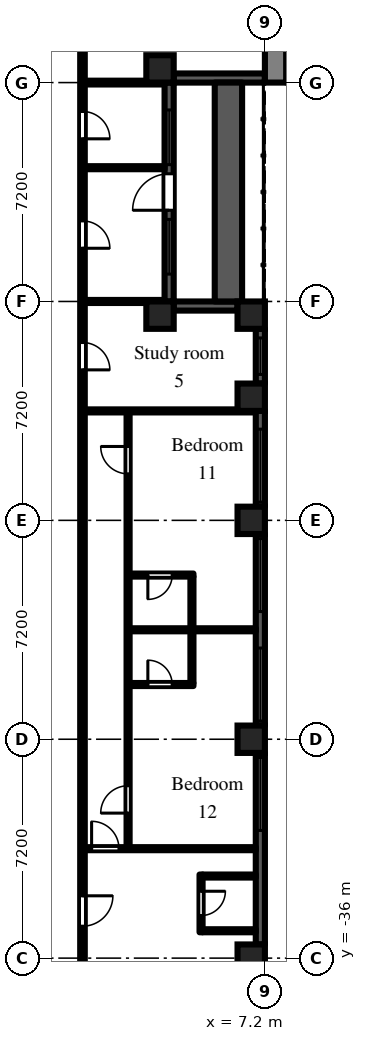
"""IFC4 building model, lengths in metres.
Left out: names, types, materials, properties, quantities, classifications, styles, units other than length and angle.
Written with IfcOpenShell. Run it as: python <this file> out.ifc"""

import sys

from ifc_helpers import new_model, si_unit, direction, frame, frame_2d, origin, origin_2d, place, context, subcontext, project, spatial, rectangle, extrude, element, fill, save


model = new_model("IFC4")
c1 = context("Model", 3, precision=1e-05, world=origin(), true_north=direction((0.0, 1.0)))
c2 = subcontext(c1, "Body", "Model", "MODEL_VIEW")
j1 = project(units=[si_unit("LENGTHUNIT", "METRE"), si_unit("PLANEANGLEUNIT", "RADIAN")], contexts=[c1])
p1 = place(None, origin())
s1 = spatial("IfcSite", under=j1, at=p1, CompositionType="ELEMENT")
p2 = place(p1, origin())
s2 = spatial("IfcBuilding", under=s1, at=p2, CompositionType="ELEMENT")
p3 = place(p2, frame((0.0, 0.0, 11.7)))
s3 = spatial("IfcBuildingStorey", under=s2, at=p3, CompositionType="ELEMENT", Elevation=11.7)
for number, where, z_axis, x_axis in (
    (1, (3.75, -14.85, 0.0), (0.0, 0.0, 1.0), (1.0, 0.0, 0.0)),
    (2, (3.75, -6.75, 0.0), (0.0, 0.0, 1.0), (1.0, 0.0, 0.0)),
    (3, (6.75, -36.0, 0.0), (0.0, 0.0, 1.0), (1.0, 0.0, 0.0)),
    (4, (6.75, -28.8, 0.0), (0.0, 0.0, 1.0), (1.0, 0.0, 0.0)),
    (5, (6.75, -21.6, 0.0), (0.0, 0.0, 1.0), (1.0, 0.0, 0.0)),
    (6, (6.75, -17.55, 0.0), (0.0, 0.0, 1.0), (1.0, 0.0, 0.0)),
    (7, (6.75, -14.85, 0.0), (0.0, 0.0, 1.0), (1.0, 0.0, 0.0)),
):
    element("IfcColumn", number, at=place(p3, frame(where, z_axis=z_axis, x_axis=x_axis)), inside=s3, PredefinedType="COLUMN", context=c2, shape_type="SweptSolid", body=[
        extrude(rectangle(XDim=0.9, YDim=0.9, at=origin_2d()), origin(), (0.0, 0.0, 1.0), 3.0),
    ])
p4 = place(p3, frame((7.05, -35.55, 0.0), z_axis=(0.0, 0.0, 1.0), x_axis=(0.0, 1.0, 0.0)))
e8 = element("IfcWall", 8, at=p4, inside=s3, PredefinedType="SOLIDWALL", context=c2, shape_type="SweptSolid", body=[
    extrude(rectangle(XDim=6.3, YDim=0.3, at=frame_2d((3.15, 0.0))), origin(), (0.0, 0.0, 1.0), 2.1),
])
p5 = place(p4, frame((3.75, 0.0, 0.2)))
e9 = element("IfcOpeningElement", 9, at=p5, cuts=e8, PredefinedType="OPENING", context=c2, shape_type="SweptSolid", body=[
    extrude(rectangle(XDim=2.4, YDim=1.85, at=frame_2d((1.2, 0.925))), frame((0.0, 0.16, 0.0), z_axis=(0.0, -1.0, 0.0), x_axis=(1.0, 0.0, 0.0)), (0.0, 0.0, 1.0), 0.32),
])
p6 = place(p3, frame((7.05, -28.35, 0.0), z_axis=(0.0, 0.0, 1.0), x_axis=(0.0, 1.0, 0.0)))
e10 = element("IfcWall", 10, at=p6, inside=s3, PredefinedType="SOLIDWALL", context=c2, shape_type="SweptSolid", body=[
    extrude(rectangle(XDim=6.3, YDim=0.3, at=frame_2d((3.15, 0.0))), origin(), (0.0, 0.0, 1.0), 2.1),
])
p7 = place(p6, frame((0.15, 0.0, 0.2)))
e11 = element("IfcOpeningElement", 11, at=p7, cuts=e10, PredefinedType="OPENING", context=c2, shape_type="SweptSolid", body=[
    extrude(rectangle(XDim=2.4, YDim=1.85, at=frame_2d((1.2, 0.925))), frame((0.0, 0.16, 0.0), z_axis=(0.0, -1.0, 0.0), x_axis=(1.0, 0.0, 0.0)), (0.0, 0.0, 1.0), 0.32),
])
p8 = place(p6, frame((3.75, 0.0, 0.2)))
e12 = element("IfcOpeningElement", 12, at=p8, cuts=e10, PredefinedType="OPENING", context=c2, shape_type="SweptSolid", body=[
    extrude(rectangle(XDim=2.4, YDim=1.85, at=frame_2d((1.2, 0.925))), frame((0.0, 0.16, 0.0), z_axis=(0.0, -1.0, 0.0), x_axis=(1.0, 0.0, 0.0)), (0.0, 0.0, 1.0), 0.32),
])
p9 = place(p3, frame((7.05, -21.15, 0.0), z_axis=(0.0, 0.0, 1.0), x_axis=(0.0, 1.0, 0.0)))
e13 = element("IfcWall", 13, at=p9, inside=s3, PredefinedType="SOLIDWALL", context=c2, shape_type="SweptSolid", body=[
    extrude(rectangle(XDim=3.15, YDim=0.3, at=frame_2d((1.575, 0.0))), origin(), (0.0, 0.0, 1.0), 2.1),
])
p10 = place(p9, frame((0.15, 0.0, 0.2)))
e14 = element("IfcOpeningElement", 14, at=p10, cuts=e13, PredefinedType="OPENING", context=c2, shape_type="SweptSolid", body=[
    extrude(rectangle(XDim=2.4, YDim=1.85, at=frame_2d((1.2, 0.925))), frame((0.0, 0.16, 0.0), z_axis=(0.0, -1.0, 0.0), x_axis=(1.0, 0.0, 0.0)), (0.0, 0.0, 1.0), 0.32),
])
p11 = place(p3, frame((7.05, -17.1, 0.0), z_axis=(0.0, 0.0, 1.0), x_axis=(0.0, 1.0, 0.0)))
e15 = element("IfcWall", 15, at=p11, inside=s3, PredefinedType="SOLIDWALL", context=c2, shape_type="SweptSolid", body=[
    extrude(rectangle(XDim=1.8, YDim=0.3, at=frame_2d((0.9, 0.0))), origin(), (0.0, 0.0, 1.0), 2.1),
])
p12 = place(p11, frame((0.3, 0.0, 0.2)))
e16 = element("IfcOpeningElement", 16, at=p12, cuts=e15, PredefinedType="OPENING", context=c2, shape_type="SweptSolid", body=[
    extrude(rectangle(XDim=1.2, YDim=1.85, at=frame_2d((0.6, 0.925))), frame((0.0, 0.16, 0.0), z_axis=(0.0, -1.0, 0.0), x_axis=(1.0, 0.0, 0.0)), (0.0, 0.0, 1.0), 0.32),
])
p13 = place(p3, frame((6.3, -14.55, 0.0), z_axis=(0.0, 0.0, 1.0), x_axis=(-1.0, 0.0, 0.0)))
e17 = element("IfcWall", 17, at=p13, inside=s3, PredefinedType="SOLIDWALL", context=c2, shape_type="SweptSolid", body=[
    extrude(rectangle(XDim=2.1, YDim=0.3, at=frame_2d((1.05, 0.0))), origin(), (0.0, 0.0, 1.0), 2.1),
])
p14 = place(p3, frame((4.05, -14.4, 0.0), z_axis=(0.0, 0.0, 1.0), x_axis=(0.0, 1.0, 0.0)))
e18 = element("IfcWall", 18, at=p14, inside=s3, PredefinedType="SOLIDWALL", context=c2, shape_type="SweptSolid", body=[
    extrude(rectangle(XDim=7.2, YDim=0.3, at=frame_2d((3.6, 0.0))), origin(), (0.0, 0.0, 1.0), 2.1),
])
p15 = place(p14, frame((3.0, 0.0, 0.0)))
e19 = element("IfcOpeningElement", 19, at=p15, cuts=e18, PredefinedType="OPENING", context=c2, shape_type="SweptSolid", body=[
    extrude(rectangle(XDim=1.2, YDim=2.05, at=frame_2d((0.6, 1.025))), frame((0.0, 0.16, 0.0), z_axis=(0.0, -1.0, 0.0), x_axis=(1.0, 0.0, 0.0)), (0.0, 0.0, 1.0), 0.32),
])
p16 = place(p14, frame((0.9, 0.0, 0.2)))
e20 = element("IfcOpeningElement", 20, at=p16, cuts=e18, PredefinedType="OPENING", context=c2, shape_type="SweptSolid", body=[
    extrude(rectangle(XDim=1.8, YDim=1.85, at=frame_2d((0.9, 0.925))), frame((0.0, 0.16, 0.0), z_axis=(0.0, -1.0, 0.0), x_axis=(1.0, 0.0, 0.0)), (0.0, 0.0, 1.0), 0.32),
])
p17 = place(p14, frame((4.5, 0.0, 0.2)))
e21 = element("IfcOpeningElement", 21, at=p17, cuts=e18, PredefinedType="OPENING", context=c2, shape_type="SweptSolid", body=[
    extrude(rectangle(XDim=1.8, YDim=1.85, at=frame_2d((0.9, 0.925))), frame((0.0, 0.16, 0.0), z_axis=(0.0, -1.0, 0.0), x_axis=(1.0, 0.0, 0.0)), (0.0, 0.0, 1.0), 0.32),
])
p18 = place(p3, frame((4.2, -7.05, 0.0), z_axis=(0.0, 0.0, 1.0), x_axis=(1.0, 0.0, 0.0)))
e22 = element("IfcWall", 22, at=p18, inside=s3, PredefinedType="SOLIDWALL", context=c2, shape_type="SweptSolid", body=[
    extrude(rectangle(XDim=3.0, YDim=0.3, at=frame_2d((1.5, 0.0))), origin(), (0.0, 0.0, 1.0), 2.1),
])
p19 = place(p3, frame((6.0, -14.4, 0.0), z_axis=(0.0, 0.0, 1.0), x_axis=(0.0, 1.0, 0.0)))
e23 = element("IfcWall", 23, at=p19, inside=s3, PredefinedType="PARAPET", context=c2, shape_type="SweptSolid", body=[
    extrude(rectangle(XDim=7.2, YDim=0.9, at=frame_2d((3.6, 0.0))), origin(), (0.0, 0.0, 1.0), 0.8),
])
p20 = place(p3, frame((7.55, -7.2, 0.0), z_axis=(0.0, 0.0, 1.0), x_axis=(0.0, 1.0, 0.0)))
e24 = element("IfcWall", 24, at=p20, inside=s3, PredefinedType="SHEAR", context=c2, shape_type="SweptSolid", body=[
    extrude(rectangle(XDim=14.4, YDim=0.7, at=frame_2d((7.2, 0.0))), origin(), (0.0, 0.0, 1.0), 2.575),
])
p21 = place(p20, frame((6.0, 0.0, 0.0)))
e25 = element("IfcOpeningElement", 25, at=p21, cuts=e24, PredefinedType="OPENING", context=c2, shape_type="SweptSolid", body=[
    extrude(rectangle(XDim=2.4, YDim=2.2, at=frame_2d((1.2, 1.1))), frame((0.0, 0.36, 0.0), z_axis=(0.0, -1.0, 0.0), x_axis=(1.0, 0.0, 0.0)), (0.0, 0.0, 1.0), 0.72),
])
p22 = place(p3, frame((1.2, -36.5, 0.0), z_axis=(0.0, 0.0, 1.0), x_axis=(0.0, 1.0, 0.0)))
e26 = element("IfcWall", 26, at=p22, inside=s3, PredefinedType="PARTITIONING", context=c2, shape_type="SweptSolid", body=[
    extrude(rectangle(XDim=35.375, YDim=0.15, at=frame_2d((17.688, 0.0))), origin(), (0.0, 0.0, 1.0), 2.575),
])
p23 = place(p22, frame((33.65, 0.0, 0.0)))
e27 = element("IfcOpeningElement", 27, at=p23, cuts=e26, PredefinedType="OPENING", context=c2, shape_type="SweptSolid", body=[
    extrude(rectangle(XDim=0.9, YDim=2.1, at=frame_2d((0.45, 1.05))), frame((0.0, 0.085, 0.0), z_axis=(0.0, -1.0, 0.0), x_axis=(1.0, 0.0, 0.0)), (0.0, 0.0, 1.0), 0.17),
])
p24 = place(p22, frame((30.65, 0.0, 0.0)))
e28 = element("IfcOpeningElement", 28, at=p24, cuts=e26, PredefinedType="OPENING", context=c2, shape_type="SweptSolid", body=[
    extrude(rectangle(XDim=0.9, YDim=2.1, at=frame_2d((0.45, 1.05))), frame((0.0, 0.085, 0.0), z_axis=(0.0, -1.0, 0.0), x_axis=(1.0, 0.0, 0.0)), (0.0, 0.0, 1.0), 0.17),
])
p25 = place(p22, frame((27.45, 0.0, 0.0)))
e29 = element("IfcOpeningElement", 29, at=p25, cuts=e26, PredefinedType="OPENING", context=c2, shape_type="SweptSolid", body=[
    extrude(rectangle(XDim=0.9, YDim=2.1, at=frame_2d((0.45, 1.05))), frame((0.0, 0.085, 0.0), z_axis=(0.0, -1.0, 0.0), x_axis=(1.0, 0.0, 0.0)), (0.0, 0.0, 1.0), 0.17),
])
p26 = place(p22, frame((23.85, 0.0, 0.0)))
e30 = element("IfcOpeningElement", 30, at=p26, cuts=e26, PredefinedType="OPENING", context=c2, shape_type="SweptSolid", body=[
    extrude(rectangle(XDim=0.9, YDim=2.1, at=frame_2d((0.45, 1.05))), frame((0.0, 0.085, 0.0), z_axis=(0.0, -1.0, 0.0), x_axis=(1.0, 0.0, 0.0)), (0.0, 0.0, 1.0), 0.17),
])
p27 = place(p22, frame((19.85, 0.0, 0.0)))
e31 = element("IfcOpeningElement", 31, at=p27, cuts=e26, PredefinedType="OPENING", context=c2, shape_type="SweptSolid", body=[
    extrude(rectangle(XDim=0.9, YDim=2.1, at=frame_2d((0.45, 1.05))), frame((0.0, 0.085, 0.0), z_axis=(0.0, -1.0, 0.0), x_axis=(1.0, 0.0, 0.0)), (0.0, 0.0, 1.0), 0.17),
])
p28 = place(p22, frame((1.55, 0.0, 0.0)))
e32 = element("IfcOpeningElement", 32, at=p28, cuts=e26, PredefinedType="OPENING", context=c2, shape_type="SweptSolid", body=[
    extrude(rectangle(XDim=1.0, YDim=2.1, at=frame_2d((0.5, 1.05))), frame((0.0, 0.085, 0.0), z_axis=(0.0, -1.0, 0.0), x_axis=(1.0, 0.0, 0.0)), (0.0, 0.0, 1.0), 0.17),
])
p29 = place(p3, frame((1.275, -32.4, 0.0), z_axis=(0.0, 0.0, 1.0), x_axis=(1.0, 0.0, 0.0)))
e33 = element("IfcWall", 33, at=p29, inside=s3, PredefinedType="PARTITIONING", context=c2, shape_type="SweptSolid", body=[
    extrude(rectangle(XDim=5.625, YDim=0.1, at=frame_2d((2.812, 0.0))), origin(), (0.0, 0.0, 1.0), 2.575),
])
p30 = place(p29, frame((0.225, 0.0, 0.0)))
e34 = element("IfcOpeningElement", 34, at=p30, cuts=e33, PredefinedType="OPENING", context=c2, shape_type="SweptSolid", body=[
    extrude(rectangle(XDim=0.9, YDim=2.1, at=frame_2d((0.45, 1.05))), frame((0.0, 0.06, 0.0), z_axis=(0.0, -1.0, 0.0), x_axis=(1.0, 0.0, 0.0)), (0.0, 0.0, 1.0), 0.12),
])
p31 = place(p3, frame((1.275, -18.0, 0.0), z_axis=(0.0, 0.0, 1.0), x_axis=(1.0, 0.0, 0.0)))
e35 = element("IfcWall", 35, at=p31, inside=s3, PredefinedType="PARTITIONING", context=c2, shape_type="SweptSolid", body=[
    extrude(rectangle(XDim=5.625, YDim=0.1, at=frame_2d((2.812, 0.0))), origin(), (0.0, 0.0, 1.0), 2.575),
])
for number, where, z_axis, x_axis in (
    (36, (1.275, -14.4, 0.0), (0.0, 0.0, 1.0), (1.0, 0.0, 0.0)),
    (37, (1.275, -10.0, 0.0), (0.0, 0.0, 1.0), (1.0, 0.0, 0.0)),
):
    element("IfcWall", number, at=place(p3, frame(where, z_axis=z_axis, x_axis=x_axis)), inside=s3, PredefinedType="PARTITIONING", context=c2, shape_type="SweptSolid", body=[
        extrude(rectangle(XDim=2.625, YDim=0.1, at=frame_2d((1.312, 0.0))), origin(), (0.0, 0.0, 1.0), 2.575),
    ])
p32 = place(p3, frame((1.275, -7.2, 0.0), z_axis=(0.0, 0.0, 1.0), x_axis=(1.0, 0.0, 0.0)))
e38 = element("IfcWall", 38, at=p32, inside=s3, PredefinedType="PARTITIONING", context=c2, shape_type="SweptSolid", body=[
    extrude(rectangle(XDim=2.625, YDim=0.125, at=frame_2d((1.312, 0.0))), origin(), (0.0, 0.0, 1.0), 2.575),
])
p33 = place(p3, frame((2.7, -32.35, 0.0), z_axis=(0.0, 0.0, 1.0), x_axis=(0.0, 1.0, 0.0)))
e39 = element("IfcWall", 39, at=p33, inside=s3, PredefinedType="PARTITIONING", context=c2, shape_type="SweptSolid", body=[
    extrude(rectangle(XDim=14.3, YDim=0.1, at=frame_2d((7.15, 0.0))), origin(), (0.0, 0.0, 1.0), 2.575),
])
p34 = place(p33, frame((1.12, 0.0, 0.0)))
e40 = element("IfcOpeningElement", 40, at=p34, cuts=e39, PredefinedType="OPENING", context=c2, shape_type="SweptSolid", body=[
    extrude(rectangle(XDim=0.9, YDim=2.1, at=frame_2d((0.45, 1.05))), frame((0.0, 0.06, 0.0), z_axis=(0.0, -1.0, 0.0), x_axis=(1.0, 0.0, 0.0)), (0.0, 0.0, 1.0), 0.12),
])
p35 = place(p33, frame((12.28, 0.0, 0.0)))
e41 = element("IfcOpeningElement", 41, at=p35, cuts=e39, PredefinedType="OPENING", context=c2, shape_type="SweptSolid", body=[
    extrude(rectangle(XDim=0.9, YDim=2.1, at=frame_2d((0.45, 1.05))), frame((0.0, 0.06, 0.0), z_axis=(0.0, -1.0, 0.0), x_axis=(1.0, 0.0, 0.0)), (0.0, 0.0, 1.0), 0.12),
])
p36 = place(p3, frame((2.75, -27.0, 0.0), z_axis=(0.0, 0.0, 1.0), x_axis=(1.0, 0.0, 0.0)))
e42 = element("IfcWall", 42, at=p36, inside=s3, PredefinedType="PARTITIONING", context=c2, shape_type="SweptSolid", body=[
    extrude(rectangle(XDim=2.1, YDim=0.1, at=frame_2d((1.05, 0.0))), origin(), (0.0, 0.0, 1.0), 2.575),
])
p37 = place(p36, frame((0.6, 0.0, 0.0)))
e43 = element("IfcOpeningElement", 43, at=p37, cuts=e42, PredefinedType="OPENING", context=c2, shape_type="SweptSolid", body=[
    extrude(rectangle(XDim=0.8, YDim=2.1, at=frame_2d((0.4, 1.05))), frame((0.0, 0.06, 0.0), z_axis=(0.0, -1.0, 0.0), x_axis=(1.0, 0.0, 0.0)), (0.0, 0.0, 1.0), 0.12),
])
p38 = place(p3, frame((2.75, -25.2, 0.0), z_axis=(0.0, 0.0, 1.0), x_axis=(1.0, 0.0, 0.0)))
e44 = element("IfcWall", 44, at=p38, inside=s3, PredefinedType="PARTITIONING", context=c2, shape_type="SweptSolid", body=[
    extrude(rectangle(XDim=4.15, YDim=0.1, at=frame_2d((2.075, 0.0))), origin(), (0.0, 0.0, 1.0), 2.575),
])
p39 = place(p3, frame((2.75, -23.4, 0.0), z_axis=(0.0, 0.0, 1.0), x_axis=(1.0, 0.0, 0.0)))
e45 = element("IfcWall", 45, at=p39, inside=s3, PredefinedType="PARTITIONING", context=c2, shape_type="SweptSolid", body=[
    extrude(rectangle(XDim=2.1, YDim=0.1, at=frame_2d((1.05, 0.0))), origin(), (0.0, 0.0, 1.0), 2.575),
])
p40 = place(p39, frame((0.6, 0.0, 0.0)))
e46 = element("IfcOpeningElement", 46, at=p40, cuts=e45, PredefinedType="OPENING", context=c2, shape_type="SweptSolid", body=[
    extrude(rectangle(XDim=0.8, YDim=2.1, at=frame_2d((0.4, 1.05))), frame((0.0, 0.06, 0.0), z_axis=(0.0, -1.0, 0.0), x_axis=(1.0, 0.0, 0.0)), (0.0, 0.0, 1.0), 0.12),
])
p41 = place(p3, frame((4.8, -26.95, 0.0), z_axis=(0.0, 0.0, 1.0), x_axis=(0.0, 1.0, 0.0)))
e47 = element("IfcWall", 47, at=p41, inside=s3, PredefinedType="PARTITIONING", context=c2, shape_type="SweptSolid", body=[
    extrude(rectangle(XDim=3.5, YDim=0.1, at=frame_2d((1.75, 0.0))), origin(), (0.0, 0.0, 1.0), 2.575),
])
p42 = place(p3, frame((5.1, -35.15, 0.0), z_axis=(0.0, 0.0, 1.0), x_axis=(0.0, 1.0, 0.0)))
e48 = element("IfcWall", 48, at=p42, inside=s3, PredefinedType="PARTITIONING", context=c2, shape_type="SweptSolid", body=[
    extrude(rectangle(XDim=1.9, YDim=0.1, at=frame_2d((0.95, 0.0))), origin(), (0.0, 0.0, 1.0), 2.575),
])
p43 = place(p42, frame((0.55, 0.0, 0.0)))
e49 = element("IfcOpeningElement", 49, at=p43, cuts=e48, PredefinedType="OPENING", context=c2, shape_type="SweptSolid", body=[
    extrude(rectangle(XDim=0.8, YDim=2.1, at=frame_2d((0.4, 1.05))), frame((0.0, 0.06, 0.0), z_axis=(0.0, -1.0, 0.0), x_axis=(1.0, 0.0, 0.0)), (0.0, 0.0, 1.0), 0.12),
])
for number, where, z_axis, x_axis in (
    (50, (5.15, -35.1, 0.0), (0.0, 0.0, 1.0), (1.0, 0.0, 0.0)),
    (51, (5.15, -33.3, 0.0), (0.0, 0.0, 1.0), (1.0, 0.0, 0.0)),
):
    element("IfcWall", number, at=place(p3, frame(where, z_axis=z_axis, x_axis=x_axis)), inside=s3, PredefinedType="PARTITIONING", context=c2, shape_type="SweptSolid", body=[
        extrude(rectangle(XDim=1.75, YDim=0.1, at=frame_2d((0.875, 0.0))), origin(), (0.0, 0.0, 1.0), 2.575),
    ])
p44 = place(p5, origin())
e52 = element("IfcWindow", 52, at=p44, inside=s3, PartitioningType="SINGLE_PANEL", PredefinedType="WINDOW", context=c2, shape_type="SweptSolid", body=[
    extrude(rectangle(XDim=2.4, YDim=1.85, at=frame_2d((1.2, 0.925))), frame((0.0, 0.03, 0.0), z_axis=(0.0, -1.0, 0.0), x_axis=(1.0, 0.0, 0.0)), (0.0, 0.0, 1.0), 0.06),
])
fill(e9, e52)
p45 = place(p7, origin())
e53 = element("IfcWindow", 53, at=p45, inside=s3, PartitioningType="SINGLE_PANEL", PredefinedType="WINDOW", context=c2, shape_type="SweptSolid", body=[
    extrude(rectangle(XDim=2.4, YDim=1.85, at=frame_2d((1.2, 0.925))), frame((0.0, 0.03, 0.0), z_axis=(0.0, -1.0, 0.0), x_axis=(1.0, 0.0, 0.0)), (0.0, 0.0, 1.0), 0.06),
])
fill(e11, e53)
p46 = place(p8, origin())
e54 = element("IfcWindow", 54, at=p46, inside=s3, PartitioningType="SINGLE_PANEL", PredefinedType="WINDOW", context=c2, shape_type="SweptSolid", body=[
    extrude(rectangle(XDim=2.4, YDim=1.85, at=frame_2d((1.2, 0.925))), frame((0.0, 0.03, 0.0), z_axis=(0.0, -1.0, 0.0), x_axis=(1.0, 0.0, 0.0)), (0.0, 0.0, 1.0), 0.06),
])
fill(e12, e54)
p47 = place(p10, origin())
e55 = element("IfcWindow", 55, at=p47, inside=s3, PartitioningType="SINGLE_PANEL", PredefinedType="WINDOW", context=c2, shape_type="SweptSolid", body=[
    extrude(rectangle(XDim=2.4, YDim=1.85, at=frame_2d((1.2, 0.925))), frame((0.0, 0.03, 0.0), z_axis=(0.0, -1.0, 0.0), x_axis=(1.0, 0.0, 0.0)), (0.0, 0.0, 1.0), 0.06),
])
fill(e14, e55)
p48 = place(p12, origin())
e56 = element("IfcWindow", 56, at=p48, inside=s3, PartitioningType="SINGLE_PANEL", PredefinedType="WINDOW", context=c2, shape_type="SweptSolid", body=[
    extrude(rectangle(XDim=1.2, YDim=1.85, at=frame_2d((0.6, 0.925))), frame((0.0, 0.03, 0.0), z_axis=(0.0, -1.0, 0.0), x_axis=(1.0, 0.0, 0.0)), (0.0, 0.0, 1.0), 0.06),
])
fill(e16, e56)
p49 = place(p15, origin())
e57 = element("IfcDoor", 57, at=p49, inside=s3, OperationType="SINGLE_SWING_LEFT", PredefinedType="DOOR", context=c2, shape_type="SweptSolid", body=[
    extrude(rectangle(XDim=1.2, YDim=2.05, at=frame_2d((0.6, 1.025))), frame((0.0, 0.025, 0.0), z_axis=(0.0, -1.0, 0.0), x_axis=(1.0, 0.0, 0.0)), (0.0, 0.0, 1.0), 0.05),
])
fill(e19, e57)
p50 = place(p16, origin())
e58 = element("IfcWindow", 58, at=p50, inside=s3, PartitioningType="SINGLE_PANEL", PredefinedType="WINDOW", context=c2, shape_type="SweptSolid", body=[
    extrude(rectangle(XDim=1.8, YDim=1.85, at=frame_2d((0.9, 0.925))), frame((0.0, 0.03, 0.0), z_axis=(0.0, -1.0, 0.0), x_axis=(1.0, 0.0, 0.0)), (0.0, 0.0, 1.0), 0.06),
])
fill(e20, e58)
p51 = place(p17, origin())
e59 = element("IfcWindow", 59, at=p51, inside=s3, PartitioningType="SINGLE_PANEL", PredefinedType="WINDOW", context=c2, shape_type="SweptSolid", body=[
    extrude(rectangle(XDim=1.8, YDim=1.85, at=frame_2d((0.9, 0.925))), frame((0.0, 0.03, 0.0), z_axis=(0.0, -1.0, 0.0), x_axis=(1.0, 0.0, 0.0)), (0.0, 0.0, 1.0), 0.06),
])
fill(e21, e59)
p52 = place(p25, frame((0.9, 0.0, 0.0), z_axis=(0.0, 0.0, 1.0), x_axis=(-1.0, 0.0, 0.0)))
e60 = element("IfcDoor", 60, at=p52, inside=s3, OperationType="SINGLE_SWING_RIGHT", PredefinedType="DOOR", context=c2, shape_type="SweptSolid", body=[
    extrude(rectangle(XDim=0.9, YDim=2.1, at=frame_2d((0.45, 1.05))), frame((0.0, 0.025, 0.0), z_axis=(0.0, -1.0, 0.0), x_axis=(1.0, 0.0, 0.0)), (0.0, 0.0, 1.0), 0.05),
])
fill(e29, e60)
p53 = place(p26, frame((0.9, 0.0, 0.0), z_axis=(0.0, 0.0, 1.0), x_axis=(-1.0, 0.0, 0.0)))
e61 = element("IfcDoor", 61, at=p53, inside=s3, OperationType="SINGLE_SWING_RIGHT", PredefinedType="DOOR", context=c2, shape_type="SweptSolid", body=[
    extrude(rectangle(XDim=0.9, YDim=2.1, at=frame_2d((0.45, 1.05))), frame((0.0, 0.025, 0.0), z_axis=(0.0, -1.0, 0.0), x_axis=(1.0, 0.0, 0.0)), (0.0, 0.0, 1.0), 0.05),
])
fill(e30, e61)
p54 = place(p27, frame((0.9, 0.0, 0.0), z_axis=(0.0, 0.0, 1.0), x_axis=(-1.0, 0.0, 0.0)))
e62 = element("IfcDoor", 62, at=p54, inside=s3, OperationType="SINGLE_SWING_RIGHT", PredefinedType="DOOR", context=c2, shape_type="SweptSolid", body=[
    extrude(rectangle(XDim=0.9, YDim=2.1, at=frame_2d((0.45, 1.05))), frame((0.0, 0.025, 0.0), z_axis=(0.0, -1.0, 0.0), x_axis=(1.0, 0.0, 0.0)), (0.0, 0.0, 1.0), 0.05),
])
fill(e31, e62)
p55 = place(p43, frame((0.8, 0.0, 0.0), z_axis=(0.0, 0.0, 1.0), x_axis=(-1.0, 0.0, 0.0)))
e63 = element("IfcDoor", 63, at=p55, inside=s3, OperationType="SINGLE_SWING_LEFT", PredefinedType="DOOR", context=c2, shape_type="SweptSolid", body=[
    extrude(rectangle(XDim=0.8, YDim=2.1, at=frame_2d((0.4, 1.05))), frame((0.0, 0.025, 0.0), z_axis=(0.0, -1.0, 0.0), x_axis=(1.0, 0.0, 0.0)), (0.0, 0.0, 1.0), 0.05),
])
fill(e49, e63)
p56 = place(p28, frame((1.0, 0.0, 0.0), z_axis=(0.0, 0.0, 1.0), x_axis=(-1.0, 0.0, 0.0)))
e64 = element("IfcDoor", 64, at=p56, inside=s3, OperationType="SINGLE_SWING_LEFT", PredefinedType="DOOR", context=c2, shape_type="SweptSolid", body=[
    extrude(rectangle(XDim=1.0, YDim=2.1, at=frame_2d((0.5, 1.05))), frame((0.0, 0.025, 0.0), z_axis=(0.0, -1.0, 0.0), x_axis=(1.0, 0.0, 0.0)), (0.0, 0.0, 1.0), 0.05),
])
fill(e32, e64)
p57 = place(p30, origin())
e65 = element("IfcDoor", 65, at=p57, inside=s3, OperationType="SINGLE_SWING_LEFT", PredefinedType="DOOR", context=c2, shape_type="SweptSolid", body=[
    extrude(rectangle(XDim=0.9, YDim=2.1, at=frame_2d((0.45, 1.05))), frame((0.0, 0.025, 0.0), z_axis=(0.0, -1.0, 0.0), x_axis=(1.0, 0.0, 0.0)), (0.0, 0.0, 1.0), 0.05),
])
fill(e34, e65)
p58 = place(p34, origin())
e66 = element("IfcDoor", 66, at=p58, inside=s3, OperationType="SINGLE_SWING_LEFT", PredefinedType="DOOR", context=c2, shape_type="SweptSolid", body=[
    extrude(rectangle(XDim=0.9, YDim=2.1, at=frame_2d((0.45, 1.05))), frame((0.0, 0.025, 0.0), z_axis=(0.0, -1.0, 0.0), x_axis=(1.0, 0.0, 0.0)), (0.0, 0.0, 1.0), 0.05),
])
fill(e40, e66)
p59 = place(p35, origin())
e67 = element("IfcDoor", 67, at=p59, inside=s3, OperationType="SINGLE_SWING_RIGHT", PredefinedType="DOOR", context=c2, shape_type="SweptSolid", body=[
    extrude(rectangle(XDim=0.9, YDim=2.1, at=frame_2d((0.45, 1.05))), frame((0.0, 0.025, 0.0), z_axis=(0.0, -1.0, 0.0), x_axis=(1.0, 0.0, 0.0)), (0.0, 0.0, 1.0), 0.05),
])
fill(e41, e67)
p60 = place(p40, frame((0.8, 0.0, 0.0), z_axis=(0.0, 0.0, 1.0), x_axis=(-1.0, 0.0, 0.0)))
e68 = element("IfcDoor", 68, at=p60, inside=s3, OperationType="SINGLE_SWING_RIGHT", PredefinedType="DOOR", context=c2, shape_type="SweptSolid", body=[
    extrude(rectangle(XDim=0.8, YDim=2.1, at=frame_2d((0.4, 1.05))), frame((0.0, 0.025, 0.0), z_axis=(0.0, -1.0, 0.0), x_axis=(1.0, 0.0, 0.0)), (0.0, 0.0, 1.0), 0.05),
])
fill(e46, e68)
p61 = place(p37, origin())
e69 = element("IfcDoor", 69, at=p61, inside=s3, OperationType="SINGLE_SWING_LEFT", PredefinedType="DOOR", context=c2, shape_type="SweptSolid", body=[
    extrude(rectangle(XDim=0.8, YDim=2.1, at=frame_2d((0.4, 1.05))), frame((0.0, 0.025, 0.0), z_axis=(0.0, -1.0, 0.0), x_axis=(1.0, 0.0, 0.0)), (0.0, 0.0, 1.0), 0.05),
])
fill(e43, e69)
save(model, sys.argv[1])
